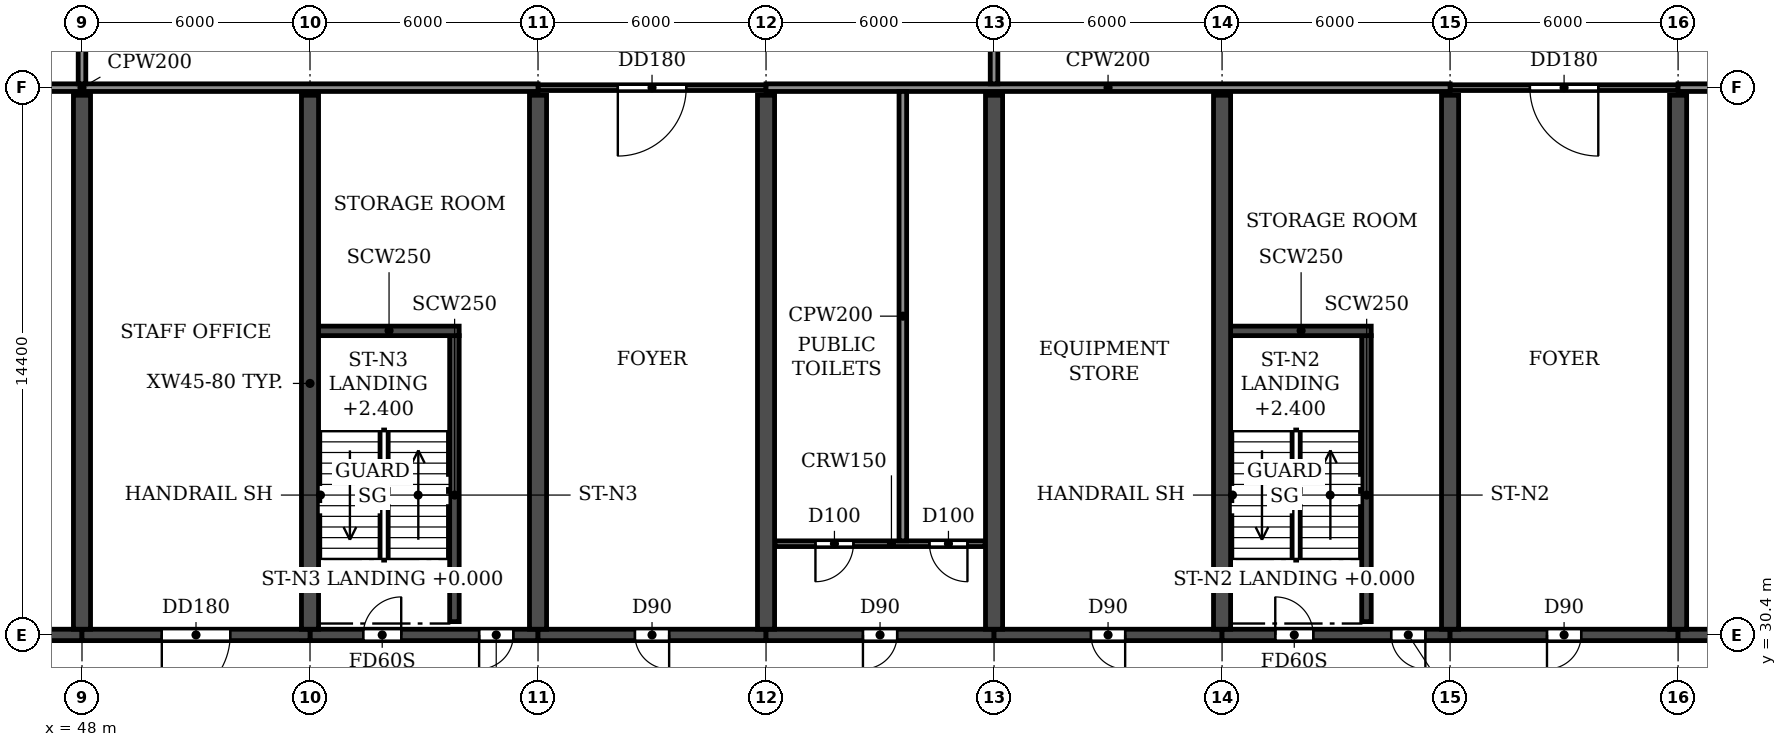
"""IFC4 building model, lengths in metres.
Left out: names, types, materials, properties, quantities, classifications, styles, units other than length and angle.
Written with IfcOpenShell. Run it as: python <this file> out.ifc"""

import sys

from ifc_helpers import new_model, si_unit, direction, frame, frame_2d, origin, place, context, subcontext, project, spatial, rectangle, extrude, element, fill, save


model = new_model("IFC4")
c1 = context("Model", 3, precision=1e-05, world=origin(), true_north=direction((0.0, 1.0)))
c2 = subcontext(c1, "Body", "Model", "MODEL_VIEW")
j1 = project(units=[si_unit("LENGTHUNIT", "METRE"), si_unit("PLANEANGLEUNIT", "RADIAN")], contexts=[c1])
p1 = place(None, origin())
s1 = spatial("IfcSite", under=j1, at=p1, CompositionType="ELEMENT")
p2 = place(p1, origin())
s2 = spatial("IfcBuilding", under=s1, at=p2, CompositionType="ELEMENT")
p3 = place(p2, frame((0.0, 0.0, 6.0)))
s3 = spatial("IfcBuildingStorey", under=s2, at=p3, CompositionType="ELEMENT", Elevation=6.0)
for number, where, z_axis, x_axis in (
    (1, (48.0, 30.55, 0.0), (0.0, 0.0, 1.0), (0.0, 1.0, 0.0)),
    (2, (54.0, 30.55, 0.0), (0.0, 0.0, 1.0), (0.0, 1.0, 0.0)),
    (3, (60.0, 30.55, 0.0), (0.0, 0.0, 1.0), (0.0, 1.0, 0.0)),
    (4, (66.0, 30.55, 0.0), (0.0, 0.0, 1.0), (0.0, 1.0, 0.0)),
    (5, (72.0, 30.55, 0.0), (0.0, 0.0, 1.0), (0.0, 1.0, 0.0)),
    (6, (78.0, 30.55, 0.0), (0.0, 0.0, 1.0), (0.0, 1.0, 0.0)),
    (7, (84.0, 30.55, 0.0), (0.0, 0.0, 1.0), (0.0, 1.0, 0.0)),
    (8, (90.0, 30.55, 0.0), (0.0, 0.0, 1.0), (0.0, 1.0, 0.0)),
):
    element("IfcWall", number, at=place(p3, frame(where, z_axis=z_axis, x_axis=x_axis)), inside=s3, PredefinedType="SHEAR", context=c2, shape_type="SweptSolid", body=[
        extrude(rectangle(XDim=14.05, YDim=0.45, at=frame_2d((7.025, 0.0))), origin(), (0.0, 0.0, 1.0), 4.52),
    ])
p4 = place(p3, frame((42.0, 30.4, 0.0), z_axis=(0.0, 0.0, 1.0), x_axis=(1.0, 0.0, 0.0)))
e9 = element("IfcWall", 9, at=p4, inside=s3, PredefinedType="SHEAR", context=c2, shape_type="SweptSolid", body=[
    extrude(rectangle(XDim=6.0, YDim=0.3, at=frame_2d((3.0, 0.0))), origin(), (0.0, 0.0, 1.0), 3.92),
])
p5 = place(p4, frame((2.55, 0.0, 0.0)))
e10 = element("IfcOpeningElement", 10, at=p5, cuts=e9, PredefinedType="OPENING", context=c2, shape_type="SweptSolid", body=[
    extrude(rectangle(XDim=0.9, YDim=2.1, at=frame_2d((0.45, 1.05))), frame((0.0, 0.16, 0.0), z_axis=(0.0, -1.0, 0.0), x_axis=(1.0, 0.0, 0.0)), (0.0, 0.0, 1.0), 0.32),
])
p6 = place(p3, frame((48.0, 30.4, 0.0), z_axis=(0.0, 0.0, 1.0), x_axis=(1.0, 0.0, 0.0)))
e11 = element("IfcWall", 11, at=p6, inside=s3, PredefinedType="SHEAR", context=c2, shape_type="SweptSolid", body=[
    extrude(rectangle(XDim=6.0, YDim=0.3, at=frame_2d((3.0, 0.0))), origin(), (0.0, 0.0, 1.0), 3.92),
])
p7 = place(p6, frame((2.1, 0.0, 0.0)))
e12 = element("IfcOpeningElement", 12, at=p7, cuts=e11, PredefinedType="OPENING", context=c2, shape_type="SweptSolid", body=[
    extrude(rectangle(XDim=1.8, YDim=2.1, at=frame_2d((0.9, 1.05))), frame((0.0, 0.16, 0.0), z_axis=(0.0, -1.0, 0.0), x_axis=(1.0, 0.0, 0.0)), (0.0, 0.0, 1.0), 0.32),
])
p8 = place(p3, frame((54.0, 30.4, 0.0), z_axis=(0.0, 0.0, 1.0), x_axis=(1.0, 0.0, 0.0)))
e13 = element("IfcWall", 13, at=p8, inside=s3, PredefinedType="SHEAR", context=c2, shape_type="SweptSolid", body=[
    extrude(rectangle(XDim=6.0, YDim=0.3, at=frame_2d((3.0, 0.0))), origin(), (0.0, 0.0, 1.0), 3.92),
])
p9 = place(p8, frame((1.4, 0.0, 0.0)))
e14 = element("IfcOpeningElement", 14, at=p9, cuts=e13, PredefinedType="OPENING", context=c2, shape_type="SweptSolid", body=[
    extrude(rectangle(XDim=1.0, YDim=2.1, at=frame_2d((0.5, 1.05))), frame((0.0, 0.16, 0.0), z_axis=(0.0, -1.0, 0.0), x_axis=(1.0, 0.0, 0.0)), (0.0, 0.0, 1.0), 0.32),
])
p10 = place(p8, frame((4.45, 0.0, 0.0)))
e15 = element("IfcOpeningElement", 15, at=p10, cuts=e13, PredefinedType="OPENING", context=c2, shape_type="SweptSolid", body=[
    extrude(rectangle(XDim=0.9, YDim=2.1, at=frame_2d((0.45, 1.05))), frame((0.0, 0.16, 0.0), z_axis=(0.0, -1.0, 0.0), x_axis=(1.0, 0.0, 0.0)), (0.0, 0.0, 1.0), 0.32),
])
p11 = place(p3, frame((60.0, 30.4, 0.0), z_axis=(0.0, 0.0, 1.0), x_axis=(1.0, 0.0, 0.0)))
e16 = element("IfcWall", 16, at=p11, inside=s3, PredefinedType="SHEAR", context=c2, shape_type="SweptSolid", body=[
    extrude(rectangle(XDim=6.0, YDim=0.3, at=frame_2d((3.0, 0.0))), origin(), (0.0, 0.0, 1.0), 3.92),
])
p12 = place(p11, frame((2.55, 0.0, 0.0)))
e17 = element("IfcOpeningElement", 17, at=p12, cuts=e16, PredefinedType="OPENING", context=c2, shape_type="SweptSolid", body=[
    extrude(rectangle(XDim=0.9, YDim=2.1, at=frame_2d((0.45, 1.05))), frame((0.0, 0.16, 0.0), z_axis=(0.0, -1.0, 0.0), x_axis=(1.0, 0.0, 0.0)), (0.0, 0.0, 1.0), 0.32),
])
p13 = place(p3, frame((66.0, 30.4, 0.0), z_axis=(0.0, 0.0, 1.0), x_axis=(1.0, 0.0, 0.0)))
e18 = element("IfcWall", 18, at=p13, inside=s3, PredefinedType="SHEAR", context=c2, shape_type="SweptSolid", body=[
    extrude(rectangle(XDim=6.0, YDim=0.3, at=frame_2d((3.0, 0.0))), origin(), (0.0, 0.0, 1.0), 3.92),
])
p14 = place(p13, frame((2.55, 0.0, 0.0)))
e19 = element("IfcOpeningElement", 19, at=p14, cuts=e18, PredefinedType="OPENING", context=c2, shape_type="SweptSolid", body=[
    extrude(rectangle(XDim=0.9, YDim=2.1, at=frame_2d((0.45, 1.05))), frame((0.0, 0.16, 0.0), z_axis=(0.0, -1.0, 0.0), x_axis=(1.0, 0.0, 0.0)), (0.0, 0.0, 1.0), 0.32),
])
p15 = place(p3, frame((72.0, 30.4, 0.0), z_axis=(0.0, 0.0, 1.0), x_axis=(1.0, 0.0, 0.0)))
e20 = element("IfcWall", 20, at=p15, inside=s3, PredefinedType="SHEAR", context=c2, shape_type="SweptSolid", body=[
    extrude(rectangle(XDim=6.0, YDim=0.3, at=frame_2d((3.0, 0.0))), origin(), (0.0, 0.0, 1.0), 3.92),
])
p16 = place(p15, frame((2.55, 0.0, 0.0)))
e21 = element("IfcOpeningElement", 21, at=p16, cuts=e20, PredefinedType="OPENING", context=c2, shape_type="SweptSolid", body=[
    extrude(rectangle(XDim=0.9, YDim=2.1, at=frame_2d((0.45, 1.05))), frame((0.0, 0.16, 0.0), z_axis=(0.0, -1.0, 0.0), x_axis=(1.0, 0.0, 0.0)), (0.0, 0.0, 1.0), 0.32),
])
p17 = place(p3, frame((78.0, 30.4, 0.0), z_axis=(0.0, 0.0, 1.0), x_axis=(1.0, 0.0, 0.0)))
e22 = element("IfcWall", 22, at=p17, inside=s3, PredefinedType="SHEAR", context=c2, shape_type="SweptSolid", body=[
    extrude(rectangle(XDim=6.0, YDim=0.3, at=frame_2d((3.0, 0.0))), origin(), (0.0, 0.0, 1.0), 3.92),
])
p18 = place(p17, frame((1.4, 0.0, 0.0)))
e23 = element("IfcOpeningElement", 23, at=p18, cuts=e22, PredefinedType="OPENING", context=c2, shape_type="SweptSolid", body=[
    extrude(rectangle(XDim=1.0, YDim=2.1, at=frame_2d((0.5, 1.05))), frame((0.0, 0.16, 0.0), z_axis=(0.0, -1.0, 0.0), x_axis=(1.0, 0.0, 0.0)), (0.0, 0.0, 1.0), 0.32),
])
p19 = place(p17, frame((4.45, 0.0, 0.0)))
e24 = element("IfcOpeningElement", 24, at=p19, cuts=e22, PredefinedType="OPENING", context=c2, shape_type="SweptSolid", body=[
    extrude(rectangle(XDim=0.9, YDim=2.1, at=frame_2d((0.45, 1.05))), frame((0.0, 0.16, 0.0), z_axis=(0.0, -1.0, 0.0), x_axis=(1.0, 0.0, 0.0)), (0.0, 0.0, 1.0), 0.32),
])
p20 = place(p3, frame((84.0, 30.4, 0.0), z_axis=(0.0, 0.0, 1.0), x_axis=(1.0, 0.0, 0.0)))
e25 = element("IfcWall", 25, at=p20, inside=s3, PredefinedType="SHEAR", context=c2, shape_type="SweptSolid", body=[
    extrude(rectangle(XDim=6.0, YDim=0.3, at=frame_2d((3.0, 0.0))), origin(), (0.0, 0.0, 1.0), 3.92),
])
p21 = place(p20, frame((2.55, 0.0, 0.0)))
e26 = element("IfcOpeningElement", 26, at=p21, cuts=e25, PredefinedType="OPENING", context=c2, shape_type="SweptSolid", body=[
    extrude(rectangle(XDim=0.9, YDim=2.1, at=frame_2d((0.45, 1.05))), frame((0.0, 0.16, 0.0), z_axis=(0.0, -1.0, 0.0), x_axis=(1.0, 0.0, 0.0)), (0.0, 0.0, 1.0), 0.32),
])
p22 = place(p3, frame((90.0, 30.4, 0.0), z_axis=(0.0, 0.0, 1.0), x_axis=(1.0, 0.0, 0.0)))
e27 = element("IfcWall", 27, at=p22, inside=s3, PredefinedType="SHEAR", context=c2, shape_type="SweptSolid", body=[
    extrude(rectangle(XDim=6.0, YDim=0.3, at=frame_2d((3.0, 0.0))), origin(), (0.0, 0.0, 1.0), 3.92),
])
p23 = place(p22, frame((2.1, 0.0, 0.0)))
e28 = element("IfcOpeningElement", 28, at=p23, cuts=e27, PredefinedType="OPENING", context=c2, shape_type="SweptSolid", body=[
    extrude(rectangle(XDim=1.8, YDim=2.1, at=frame_2d((0.9, 1.05))), frame((0.0, 0.16, 0.0), z_axis=(0.0, -1.0, 0.0), x_axis=(1.0, 0.0, 0.0)), (0.0, 0.0, 1.0), 0.32),
])
p24 = place(p3, frame((57.8, 30.75, 0.0), z_axis=(0.0, 0.0, 1.0), x_axis=(0.0, 1.0, 0.0)))
e29 = element("IfcWall", 29, at=p24, inside=s3, PredefinedType="SOLIDWALL", context=c2, shape_type="SweptSolid", body=[
    extrude(rectangle(XDim=7.525, YDim=0.25, at=frame_2d((3.762, 0.0))), origin(), (0.0, 0.0, 1.0), 4.52),
])
p25 = place(p3, frame((54.0, 38.4, 0.0), z_axis=(0.0, 0.0, 1.0), x_axis=(1.0, 0.0, 0.0)))
e30 = element("IfcWall", 30, at=p25, inside=s3, PredefinedType="SOLIDWALL", context=c2, shape_type="SweptSolid", body=[
    extrude(rectangle(XDim=3.925, YDim=0.25, at=frame_2d((1.962, 0.0))), origin(), (0.0, 0.0, 1.0), 4.52),
])
p26 = place(p3, frame((81.8, 30.75, 0.0), z_axis=(0.0, 0.0, 1.0), x_axis=(0.0, 1.0, 0.0)))
e31 = element("IfcWall", 31, at=p26, inside=s3, PredefinedType="SOLIDWALL", context=c2, shape_type="SweptSolid", body=[
    extrude(rectangle(XDim=7.525, YDim=0.25, at=frame_2d((3.762, 0.0))), origin(), (0.0, 0.0, 1.0), 4.52),
])
p27 = place(p3, frame((78.0, 38.4, 0.0), z_axis=(0.0, 0.0, 1.0), x_axis=(1.0, 0.0, 0.0)))
e32 = element("IfcWall", 32, at=p27, inside=s3, PredefinedType="SOLIDWALL", context=c2, shape_type="SweptSolid", body=[
    extrude(rectangle(XDim=3.925, YDim=0.25, at=frame_2d((1.962, 0.0))), origin(), (0.0, 0.0, 1.0), 4.52),
])
p28 = place(p3, frame((66.235, 32.8, 0.0), z_axis=(0.0, 0.0, 1.0), x_axis=(1.0, 0.0, 0.0)))
e33 = element("IfcWall", 33, at=p28, inside=s3, PredefinedType="PARTITIONING", context=c2, shape_type="SweptSolid", body=[
    extrude(rectangle(XDim=5.53, YDim=0.15, at=frame_2d((2.765, 0.0))), origin(), (0.0, 0.0, 1.0), 4.52),
])
p29 = place(p28, frame((1.065, 0.0, 0.0)))
e34 = element("IfcOpeningElement", 34, at=p29, cuts=e33, PredefinedType="OPENING", context=c2, shape_type="SweptSolid", body=[
    extrude(rectangle(XDim=1.0, YDim=2.1, at=frame_2d((0.5, 1.05))), frame((0.0, 0.085, 0.0), z_axis=(0.0, -1.0, 0.0), x_axis=(1.0, 0.0, 0.0)), (0.0, 0.0, 1.0), 0.17),
])
p30 = place(p28, frame((4.065, 0.0, 0.0)))
e35 = element("IfcOpeningElement", 35, at=p30, cuts=e33, PredefinedType="OPENING", context=c2, shape_type="SweptSolid", body=[
    extrude(rectangle(XDim=1.0, YDim=2.1, at=frame_2d((0.5, 1.05))), frame((0.0, 0.085, 0.0), z_axis=(0.0, -1.0, 0.0), x_axis=(1.0, 0.0, 0.0)), (0.0, 0.0, 1.0), 0.17),
])
p31 = place(p3, frame((60.0, 44.8, 0.0), z_axis=(0.0, 0.0, 1.0), x_axis=(1.0, 0.0, 0.0)))
e36 = element("IfcWall", 36, at=p31, inside=s3, PredefinedType="PARTITIONING", context=c2, shape_type="SweptSolid", body=[
    extrude(rectangle(XDim=6.0, YDim=0.15, at=frame_2d((3.0, 0.0))), origin(), (0.0, 0.0, 1.0), 4.52),
])
p32 = place(p31, frame((2.1, 0.0, 0.0)))
e37 = element("IfcOpeningElement", 37, at=p32, cuts=e36, PredefinedType="OPENING", context=c2, shape_type="SweptSolid", body=[
    extrude(rectangle(XDim=1.8, YDim=2.1, at=frame_2d((0.9, 1.05))), frame((0.0, 0.085, 0.0), z_axis=(0.0, -1.0, 0.0), x_axis=(1.0, 0.0, 0.0)), (0.0, 0.0, 1.0), 0.17),
])
p33 = place(p3, frame((84.0, 44.8, 0.0), z_axis=(0.0, 0.0, 1.0), x_axis=(1.0, 0.0, 0.0)))
e38 = element("IfcWall", 38, at=p33, inside=s3, PredefinedType="PARTITIONING", context=c2, shape_type="SweptSolid", body=[
    extrude(rectangle(XDim=6.0, YDim=0.15, at=frame_2d((3.0, 0.0))), origin(), (0.0, 0.0, 1.0), 4.52),
])
p34 = place(p33, frame((2.1, 0.0, 0.0)))
e39 = element("IfcOpeningElement", 39, at=p34, cuts=e38, PredefinedType="OPENING", context=c2, shape_type="SweptSolid", body=[
    extrude(rectangle(XDim=1.8, YDim=2.1, at=frame_2d((0.9, 1.05))), frame((0.0, 0.085, 0.0), z_axis=(0.0, -1.0, 0.0), x_axis=(1.0, 0.0, 0.0)), (0.0, 0.0, 1.0), 0.17),
])
p35 = place(p3, frame((36.0, 44.8, 0.0), z_axis=(0.0, 0.0, 1.0), x_axis=(1.0, 0.0, 0.0)))
e40 = element("IfcWall", 40, at=p35, inside=s3, PredefinedType="PARTITIONING", context=c2, shape_type="SweptSolid", body=[
    extrude(rectangle(XDim=24.0, YDim=0.2, at=frame_2d((12.0, 0.0))), origin(), (0.0, 0.0, 1.0), 4.52),
])
p36 = place(p3, frame((66.0, 44.8, 0.0), z_axis=(0.0, 0.0, 1.0), x_axis=(1.0, 0.0, 0.0)))
e41 = element("IfcWall", 41, at=p36, inside=s3, PredefinedType="PARTITIONING", context=c2, shape_type="SweptSolid", body=[
    extrude(rectangle(XDim=18.0, YDim=0.2, at=frame_2d((9.0, 0.0))), origin(), (0.0, 0.0, 1.0), 4.52),
])
p37 = place(p3, frame((90.0, 44.8, 0.0), z_axis=(0.0, 0.0, 1.0), x_axis=(1.0, 0.0, 0.0)))
e42 = element("IfcWall", 42, at=p37, inside=s3, PredefinedType="PARTITIONING", context=c2, shape_type="SweptSolid", body=[
    extrude(rectangle(XDim=6.1, YDim=0.2, at=frame_2d((3.05, 0.0))), origin(), (0.0, 0.0, 1.0), 4.52),
])
p38 = place(p3, frame((48.0, 44.9, 0.0), z_axis=(0.0, 0.0, 1.0), x_axis=(0.0, 1.0, 0.0)))
e43 = element("IfcWall", 43, at=p38, inside=s3, PredefinedType="PARTITIONING", context=c2, shape_type="SweptSolid", body=[
    extrude(rectangle(XDim=23.84, YDim=0.2, at=frame_2d((11.92, 0.0))), origin(), (0.0, 0.0, 1.0), 4.52),
])
p39 = place(p3, frame((69.6, 32.875, 0.0), z_axis=(0.0, 0.0, 1.0), x_axis=(0.0, 1.0, 0.0)))
e44 = element("IfcWall", 44, at=p39, inside=s3, PredefinedType="PARTITIONING", context=c2, shape_type="SweptSolid", body=[
    extrude(rectangle(XDim=11.825, YDim=0.2, at=frame_2d((5.913, 0.0))), origin(), (0.0, 0.0, 1.0), 4.52),
])
p40 = place(p3, frame((72.0, 44.9, 0.0), z_axis=(0.0, 0.0, 1.0), x_axis=(0.0, 1.0, 0.0)))
e45 = element("IfcWall", 45, at=p40, inside=s3, PredefinedType="PARTITIONING", context=c2, shape_type="SweptSolid", body=[
    extrude(rectangle(XDim=23.84, YDim=0.2, at=frame_2d((11.92, 0.0))), origin(), (0.0, 0.0, 1.0), 4.52),
])
p41 = place(p7, frame((1.8, 0.0, 0.0), z_axis=(0.0, 0.0, 1.0), x_axis=(-1.0, 0.0, 0.0)))
e46 = element("IfcDoor", 46, at=p41, inside=s3, OperationType="DOUBLE_DOOR_SINGLE_SWING", PredefinedType="DOOR", context=c2, shape_type="SweptSolid", body=[
    extrude(rectangle(XDim=1.8, YDim=2.1, at=frame_2d((0.9, 1.05))), frame((0.0, 0.025, 0.0), z_axis=(0.0, -1.0, 0.0), x_axis=(1.0, 0.0, 0.0)), (0.0, 0.0, 1.0), 0.05),
])
fill(e12, e46)
p42 = place(p9, origin())
e47 = element("IfcDoor", 47, at=p42, inside=s3, OperationType="SINGLE_SWING_RIGHT", PredefinedType="DOOR", context=c2, shape_type="SweptSolid", body=[
    extrude(rectangle(XDim=1.0, YDim=2.1, at=frame_2d((0.5, 1.05))), frame((0.0, 0.025, 0.0), z_axis=(0.0, -1.0, 0.0), x_axis=(1.0, 0.0, 0.0)), (0.0, 0.0, 1.0), 0.05),
])
fill(e14, e47)
p43 = place(p10, frame((0.9, 0.0, 0.0), z_axis=(0.0, 0.0, 1.0), x_axis=(-1.0, 0.0, 0.0)))
e48 = element("IfcDoor", 48, at=p43, inside=s3, OperationType="SINGLE_SWING_RIGHT", PredefinedType="DOOR", context=c2, shape_type="SweptSolid", body=[
    extrude(rectangle(XDim=0.9, YDim=2.1, at=frame_2d((0.45, 1.05))), frame((0.0, 0.025, 0.0), z_axis=(0.0, -1.0, 0.0), x_axis=(1.0, 0.0, 0.0)), (0.0, 0.0, 1.0), 0.05),
])
fill(e15, e48)
p44 = place(p12, frame((0.9, 0.0, 0.0), z_axis=(0.0, 0.0, 1.0), x_axis=(-1.0, 0.0, 0.0)))
e49 = element("IfcDoor", 49, at=p44, inside=s3, OperationType="SINGLE_SWING_LEFT", PredefinedType="DOOR", context=c2, shape_type="SweptSolid", body=[
    extrude(rectangle(XDim=0.9, YDim=2.1, at=frame_2d((0.45, 1.05))), frame((0.0, 0.025, 0.0), z_axis=(0.0, -1.0, 0.0), x_axis=(1.0, 0.0, 0.0)), (0.0, 0.0, 1.0), 0.05),
])
fill(e17, e49)
p45 = place(p14, frame((0.9, 0.0, 0.0), z_axis=(0.0, 0.0, 1.0), x_axis=(-1.0, 0.0, 0.0)))
e50 = element("IfcDoor", 50, at=p45, inside=s3, OperationType="SINGLE_SWING_RIGHT", PredefinedType="DOOR", context=c2, shape_type="SweptSolid", body=[
    extrude(rectangle(XDim=0.9, YDim=2.1, at=frame_2d((0.45, 1.05))), frame((0.0, 0.025, 0.0), z_axis=(0.0, -1.0, 0.0), x_axis=(1.0, 0.0, 0.0)), (0.0, 0.0, 1.0), 0.05),
])
fill(e19, e50)
p46 = place(p16, frame((0.9, 0.0, 0.0), z_axis=(0.0, 0.0, 1.0), x_axis=(-1.0, 0.0, 0.0)))
e51 = element("IfcDoor", 51, at=p46, inside=s3, OperationType="SINGLE_SWING_LEFT", PredefinedType="DOOR", context=c2, shape_type="SweptSolid", body=[
    extrude(rectangle(XDim=0.9, YDim=2.1, at=frame_2d((0.45, 1.05))), frame((0.0, 0.025, 0.0), z_axis=(0.0, -1.0, 0.0), x_axis=(1.0, 0.0, 0.0)), (0.0, 0.0, 1.0), 0.05),
])
fill(e21, e51)
p47 = place(p18, origin())
e52 = element("IfcDoor", 52, at=p47, inside=s3, OperationType="SINGLE_SWING_LEFT", PredefinedType="DOOR", context=c2, shape_type="SweptSolid", body=[
    extrude(rectangle(XDim=1.0, YDim=2.1, at=frame_2d((0.5, 1.05))), frame((0.0, 0.025, 0.0), z_axis=(0.0, -1.0, 0.0), x_axis=(1.0, 0.0, 0.0)), (0.0, 0.0, 1.0), 0.05),
])
fill(e23, e52)
p48 = place(p19, frame((0.9, 0.0, 0.0), z_axis=(0.0, 0.0, 1.0), x_axis=(-1.0, 0.0, 0.0)))
e53 = element("IfcDoor", 53, at=p48, inside=s3, OperationType="SINGLE_SWING_LEFT", PredefinedType="DOOR", context=c2, shape_type="SweptSolid", body=[
    extrude(rectangle(XDim=0.9, YDim=2.1, at=frame_2d((0.45, 1.05))), frame((0.0, 0.025, 0.0), z_axis=(0.0, -1.0, 0.0), x_axis=(1.0, 0.0, 0.0)), (0.0, 0.0, 1.0), 0.05),
])
fill(e24, e53)
p49 = place(p21, frame((0.9, 0.0, 0.0), z_axis=(0.0, 0.0, 1.0), x_axis=(-1.0, 0.0, 0.0)))
e54 = element("IfcDoor", 54, at=p49, inside=s3, OperationType="SINGLE_SWING_RIGHT", PredefinedType="DOOR", context=c2, shape_type="SweptSolid", body=[
    extrude(rectangle(XDim=0.9, YDim=2.1, at=frame_2d((0.45, 1.05))), frame((0.0, 0.025, 0.0), z_axis=(0.0, -1.0, 0.0), x_axis=(1.0, 0.0, 0.0)), (0.0, 0.0, 1.0), 0.05),
])
fill(e26, e54)
p50 = place(p29, frame((1.0, 0.0, 0.0), z_axis=(0.0, 0.0, 1.0), x_axis=(-1.0, 0.0, 0.0)))
e55 = element("IfcDoor", 55, at=p50, inside=s3, OperationType="SINGLE_SWING_RIGHT", PredefinedType="DOOR", context=c2, shape_type="SweptSolid", body=[
    extrude(rectangle(XDim=1.0, YDim=2.1, at=frame_2d((0.5, 1.05))), frame((0.0, 0.025, 0.0), z_axis=(0.0, -1.0, 0.0), x_axis=(1.0, 0.0, 0.0)), (0.0, 0.0, 1.0), 0.05),
])
fill(e34, e55)
p51 = place(p30, frame((1.0, 0.0, 0.0), z_axis=(0.0, 0.0, 1.0), x_axis=(-1.0, 0.0, 0.0)))
e56 = element("IfcDoor", 56, at=p51, inside=s3, OperationType="SINGLE_SWING_LEFT", PredefinedType="DOOR", context=c2, shape_type="SweptSolid", body=[
    extrude(rectangle(XDim=1.0, YDim=2.1, at=frame_2d((0.5, 1.05))), frame((0.0, 0.025, 0.0), z_axis=(0.0, -1.0, 0.0), x_axis=(1.0, 0.0, 0.0)), (0.0, 0.0, 1.0), 0.05),
])
fill(e35, e56)
p52 = place(p32, frame((1.8, 0.0, 0.0), z_axis=(0.0, 0.0, 1.0), x_axis=(-1.0, 0.0, 0.0)))
e57 = element("IfcDoor", 57, at=p52, inside=s3, OperationType="DOUBLE_DOOR_SINGLE_SWING", PredefinedType="DOOR", context=c2, shape_type="SweptSolid", body=[
    extrude(rectangle(XDim=1.8, YDim=2.1, at=frame_2d((0.9, 1.05))), frame((0.0, 0.025, 0.0), z_axis=(0.0, -1.0, 0.0), x_axis=(1.0, 0.0, 0.0)), (0.0, 0.0, 1.0), 0.05),
])
fill(e37, e57)
p53 = place(p34, frame((1.8, 0.0, 0.0), z_axis=(0.0, 0.0, 1.0), x_axis=(-1.0, 0.0, 0.0)))
e58 = element("IfcDoor", 58, at=p53, inside=s3, OperationType="DOUBLE_DOOR_SINGLE_SWING", PredefinedType="DOOR", context=c2, shape_type="SweptSolid", body=[
    extrude(rectangle(XDim=1.8, YDim=2.1, at=frame_2d((0.9, 1.05))), frame((0.0, 0.025, 0.0), z_axis=(0.0, -1.0, 0.0), x_axis=(1.0, 0.0, 0.0)), (0.0, 0.0, 1.0), 0.05),
])
fill(e39, e58)
save(model, sys.argv[1])
